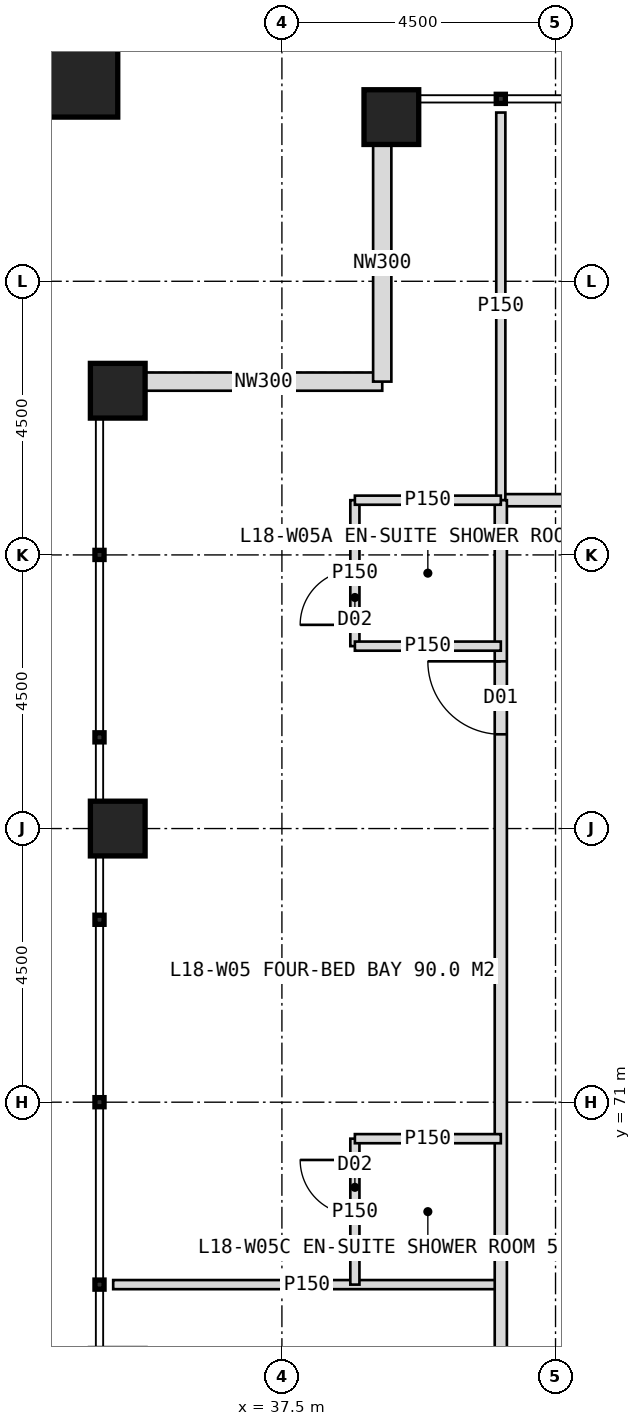
"""IFC4 building model, lengths in metres.
Left out: names, types, materials, properties, quantities, classifications, styles, units other than length and angle.
Written with IfcOpenShell. Run it as: python <this file> out.ifc"""

import sys

from ifc_helpers import new_model, si_unit, direction, frame, frame_2d, origin, origin_2d, place, context, subcontext, project, spatial, rectangle, hollow_rectangle, extrude, element, fill, save


model = new_model("IFC4")
c1 = context("Model", 3, precision=1e-05, world=origin(), true_north=direction((0.0, 1.0)))
c2 = subcontext(c1, "Body", "Model", "MODEL_VIEW")
j1 = project(units=[si_unit("LENGTHUNIT", "METRE"), si_unit("PLANEANGLEUNIT", "RADIAN")], contexts=[c1])
p1 = place(None, origin())
s1 = spatial("IfcSite", under=j1, at=p1, CompositionType="ELEMENT")
p2 = place(p1, origin())
s2 = spatial("IfcBuilding", under=s1, at=p2, CompositionType="ELEMENT")
p3 = place(p2, frame((0.0, 0.0, 79.0)))
s3 = spatial("IfcBuildingStorey", under=s2, at=p3, CompositionType="ELEMENT", Elevation=79.0)
for number, where, z_axis, x_axis in (
    (1, (39.3, 87.2, 0.0), (0.0, 0.0, 1.0), (1.0, 0.0, 0.0)),
    (2, (34.8, 75.5, 0.0), (0.0, 0.0, 1.0), (1.0, 0.0, 0.0)),
    (3, (34.8, 82.7, 0.0), (0.0, 0.0, 1.0), (1.0, 0.0, 0.0)),
):
    element("IfcColumn", number, at=place(p3, frame(where, z_axis=z_axis, x_axis=x_axis)), inside=s3, PredefinedType="COLUMN", context=c2, shape_type="SweptSolid", body=[
        extrude(hollow_rectangle(XDim=0.9, YDim=0.9, WallThickness=0.08, at=origin_2d()), origin(), (0.0, 0.0, 1.0), 4.0),
    ])
p4 = place(p3, frame((33.9, 88.1, 0.0), z_axis=(0.0, 0.0, 1.0), x_axis=(1.0, 0.0, 0.0)))
e4 = element("IfcColumn", 4, at=p4, inside=s3, PredefinedType="COLUMN", context=c2, shape_type="SweptSolid", body=[
    extrude(hollow_rectangle(XDim=1.8, YDim=1.8, WallThickness=0.1, at=origin_2d()), origin(), (0.0, 0.0, 1.0), 4.0),
])
for number, where, z_axis, x_axis in (
    (5, (35.25, 82.85, 0.0), (0.0, 0.0, 1.0), (1.0, 0.0, 0.0)),
    (6, (39.15, 82.85, 0.0), (0.0, 0.0, 1.0), (0.0, 1.0, 0.0)),
):
    element("IfcWall", number, at=place(p3, frame(where, z_axis=z_axis, x_axis=x_axis)), inside=s3, PredefinedType="ELEMENTEDWALL", context=c2, shape_type="SweptSolid", body=[
        extrude(rectangle(XDim=3.9, YDim=0.3, at=frame_2d((1.95, 0.0))), origin(), (0.0, 0.0, 1.0), 2.95),
    ])
p5 = place(p3, frame((41.1, 80.9, 0.0), z_axis=(0.0, 0.0, 1.0), x_axis=(1.0, 0.0, 0.0)))
e7 = element("IfcWall", 7, at=p5, inside=s3, PredefinedType="PARTITIONING", context=c2, shape_type="SweptSolid", body=[
    extrude(rectangle(XDim=37.8, YDim=0.2, at=frame_2d((18.9, 0.0))), origin(), (0.0, 0.0, 1.0), 3.75),
])
p6 = place(p5, frame((5.85, 0.0, 0.0)))
e8 = element("IfcOpeningElement", 8, at=p6, cuts=e7, PredefinedType="OPENING", context=c2, shape_type="SweptSolid", body=[
    extrude(rectangle(XDim=1.2, YDim=2.2, at=frame_2d((0.6, 1.1))), frame((0.0, 0.11, 0.0), z_axis=(0.0, -1.0, 0.0), x_axis=(1.0, 0.0, 0.0)), (0.0, 0.0, 1.0), 0.22),
])
p7 = place(p5, frame((18.3, 0.0, 0.0)))
e9 = element("IfcOpeningElement", 9, at=p7, cuts=e7, PredefinedType="OPENING", context=c2, shape_type="SweptSolid", body=[
    extrude(rectangle(XDim=1.2, YDim=2.2, at=frame_2d((0.6, 1.1))), frame((0.0, 0.11, 0.0), z_axis=(0.0, -1.0, 0.0), x_axis=(1.0, 0.0, 0.0)), (0.0, 0.0, 1.0), 0.22),
])
p8 = place(p5, frame((33.95, 0.0, 0.0)))
e10 = element("IfcOpeningElement", 10, at=p8, cuts=e7, PredefinedType="OPENING", context=c2, shape_type="SweptSolid", body=[
    extrude(rectangle(XDim=1.2, YDim=2.2, at=frame_2d((0.6, 1.1))), frame((0.0, 0.11, 0.0), z_axis=(0.0, -1.0, 0.0), x_axis=(1.0, 0.0, 0.0)), (0.0, 0.0, 1.0), 0.22),
])
for number, where, z_axis, x_axis in (
    (11, (41.1, 80.9, 0.0), (0.0, 0.0, 1.0), (0.0, 1.0, 0.0)),
    (12, (41.1, 68.0, 0.0), (0.0, 0.0, 1.0), (-1.0, 0.0, 0.0)),
):
    element("IfcWall", number, at=place(p3, frame(where, z_axis=z_axis, x_axis=x_axis)), inside=s3, PredefinedType="PARTITIONING", context=c2, shape_type="SweptSolid", body=[
        extrude(rectangle(XDim=6.375, YDim=0.15, at=frame_2d((3.188, 0.0))), origin(), (0.0, 0.0, 1.0), 3.75),
    ])
p9 = place(p3, frame((41.1, 43.1, 0.0), z_axis=(0.0, 0.0, 1.0), x_axis=(0.0, 1.0, 0.0)))
e13 = element("IfcWall", 13, at=p9, inside=s3, PredefinedType="PARTITIONING", context=c2, shape_type="SweptSolid", body=[
    extrude(rectangle(XDim=37.8, YDim=0.2, at=frame_2d((18.9, 0.0))), origin(), (0.0, 0.0, 1.0), 3.75),
])
p10 = place(p9, frame((2.45, 0.0, 0.0)))
e14 = element("IfcOpeningElement", 14, at=p10, cuts=e13, PredefinedType="OPENING", context=c2, shape_type="SweptSolid", body=[
    extrude(rectangle(XDim=1.2, YDim=2.2, at=frame_2d((0.6, 1.1))), frame((0.0, 0.11, 0.0), z_axis=(0.0, -1.0, 0.0), x_axis=(1.0, 0.0, 0.0)), (0.0, 0.0, 1.0), 0.22),
])
p11 = place(p9, frame((9.55, 0.0, 0.0)))
e15 = element("IfcOpeningElement", 15, at=p11, cuts=e13, PredefinedType="OPENING", context=c2, shape_type="SweptSolid", body=[
    extrude(rectangle(XDim=1.2, YDim=2.2, at=frame_2d((0.6, 1.1))), frame((0.0, 0.11, 0.0), z_axis=(0.0, -1.0, 0.0), x_axis=(1.0, 0.0, 0.0)), (0.0, 0.0, 1.0), 0.22),
])
p12 = place(p9, frame((15.05, 0.0, 0.0)))
e16 = element("IfcOpeningElement", 16, at=p12, cuts=e13, PredefinedType="OPENING", context=c2, shape_type="SweptSolid", body=[
    extrude(rectangle(XDim=1.2, YDim=2.2, at=frame_2d((0.6, 1.1))), frame((0.0, 0.11, 0.0), z_axis=(0.0, -1.0, 0.0), x_axis=(1.0, 0.0, 0.0)), (0.0, 0.0, 1.0), 0.22),
])
p13 = place(p9, frame((21.55, 0.0, 0.0)))
e17 = element("IfcOpeningElement", 17, at=p13, cuts=e13, PredefinedType="OPENING", context=c2, shape_type="SweptSolid", body=[
    extrude(rectangle(XDim=1.2, YDim=2.2, at=frame_2d((0.6, 1.1))), frame((0.0, 0.11, 0.0), z_axis=(0.0, -1.0, 0.0), x_axis=(1.0, 0.0, 0.0)), (0.0, 0.0, 1.0), 0.22),
])
p14 = place(p9, frame((33.95, 0.0, 0.0)))
e18 = element("IfcOpeningElement", 18, at=p14, cuts=e13, PredefinedType="OPENING", context=c2, shape_type="SweptSolid", body=[
    extrude(rectangle(XDim=1.2, YDim=2.2, at=frame_2d((0.6, 1.1))), frame((0.0, 0.11, 0.0), z_axis=(0.0, -1.0, 0.0), x_axis=(1.0, 0.0, 0.0)), (0.0, 0.0, 1.0), 0.22),
])
p15 = place(p3, frame((38.7, 78.5, 0.0), z_axis=(0.0, 0.0, 1.0), x_axis=(0.0, 1.0, 0.0)))
e19 = element("IfcWall", 19, at=p15, inside=s3, PredefinedType="PARTITIONING", context=c2, shape_type="SweptSolid", body=[
    extrude(rectangle(XDim=2.4, YDim=0.15, at=frame_2d((1.2, 0.0))), origin(), (0.0, 0.0, 1.0), 3.75),
])
p16 = place(p15, frame((0.35, 0.0, 0.0)))
e20 = element("IfcOpeningElement", 20, at=p16, cuts=e19, PredefinedType="OPENING", context=c2, shape_type="SweptSolid", body=[
    extrude(rectangle(XDim=0.9, YDim=2.1, at=frame_2d((0.45, 1.05))), frame((0.0, 0.085, 0.0), z_axis=(0.0, -1.0, 0.0), x_axis=(1.0, 0.0, 0.0)), (0.0, 0.0, 1.0), 0.17),
])
p17 = place(p3, frame((41.1, 78.5, 0.0), z_axis=(0.0, 0.0, 1.0), x_axis=(-1.0, 0.0, 0.0)))
e21 = element("IfcWall", 21, at=p17, inside=s3, PredefinedType="PARTITIONING", context=c2, shape_type="SweptSolid", body=[
    extrude(rectangle(XDim=2.4, YDim=0.15, at=frame_2d((1.2, 0.0))), origin(), (0.0, 0.0, 1.0), 3.75),
])
p18 = place(p3, frame((38.7, 68.0, 0.0), z_axis=(0.0, 0.0, 1.0), x_axis=(0.0, 1.0, 0.0)))
e22 = element("IfcWall", 22, at=p18, inside=s3, PredefinedType="PARTITIONING", context=c2, shape_type="SweptSolid", body=[
    extrude(rectangle(XDim=2.4, YDim=0.15, at=frame_2d((1.2, 0.0))), origin(), (0.0, 0.0, 1.0), 3.75),
])
p19 = place(p18, frame((1.15, 0.0, 0.0)))
e23 = element("IfcOpeningElement", 23, at=p19, cuts=e22, PredefinedType="OPENING", context=c2, shape_type="SweptSolid", body=[
    extrude(rectangle(XDim=0.9, YDim=2.1, at=frame_2d((0.45, 1.05))), frame((0.0, 0.085, 0.0), z_axis=(0.0, -1.0, 0.0), x_axis=(1.0, 0.0, 0.0)), (0.0, 0.0, 1.0), 0.17),
])
for number, where, z_axis, x_axis in (
    (24, (41.1, 70.4, 0.0), (0.0, 0.0, 1.0), (-1.0, 0.0, 0.0)),
    (25, (41.1, 80.9, 0.0), (0.0, 0.0, 1.0), (-1.0, 0.0, 0.0)),
):
    element("IfcWall", number, at=place(p3, frame(where, z_axis=z_axis, x_axis=x_axis)), inside=s3, PredefinedType="PARTITIONING", context=c2, shape_type="SweptSolid", body=[
        extrude(rectangle(XDim=2.4, YDim=0.15, at=frame_2d((1.2, 0.0))), origin(), (0.0, 0.0, 1.0), 3.75),
    ])
p20 = place(p14, origin())
e26 = element("IfcDoor", 26, at=p20, inside=s3, OperationType="SINGLE_SWING_RIGHT", PredefinedType="DOOR", context=c2, shape_type="SweptSolid", body=[
    extrude(rectangle(XDim=1.2, YDim=2.2, at=frame_2d((0.6, 1.1))), frame((0.0, 0.025, 0.0), z_axis=(0.0, -1.0, 0.0), x_axis=(1.0, 0.0, 0.0)), (0.0, 0.0, 1.0), 0.05),
])
fill(e18, e26)
p21 = place(p16, origin())
e27 = element("IfcDoor", 27, at=p21, inside=s3, OperationType="SINGLE_SWING_LEFT", PredefinedType="DOOR", context=c2, shape_type="SweptSolid", body=[
    extrude(rectangle(XDim=0.9, YDim=2.1, at=frame_2d((0.45, 1.05))), frame((0.0, 0.025, 0.0), z_axis=(0.0, -1.0, 0.0), x_axis=(1.0, 0.0, 0.0)), (0.0, 0.0, 1.0), 0.05),
])
fill(e20, e27)
p22 = place(p19, origin())
e28 = element("IfcDoor", 28, at=p22, inside=s3, OperationType="SINGLE_SWING_RIGHT", PredefinedType="DOOR", context=c2, shape_type="SweptSolid", body=[
    extrude(rectangle(XDim=0.9, YDim=2.1, at=frame_2d((0.45, 1.05))), frame((0.0, 0.025, 0.0), z_axis=(0.0, -1.0, 0.0), x_axis=(1.0, 0.0, 0.0)), (0.0, 0.0, 1.0), 0.05),
])
fill(e23, e28)
save(model, sys.argv[1])
